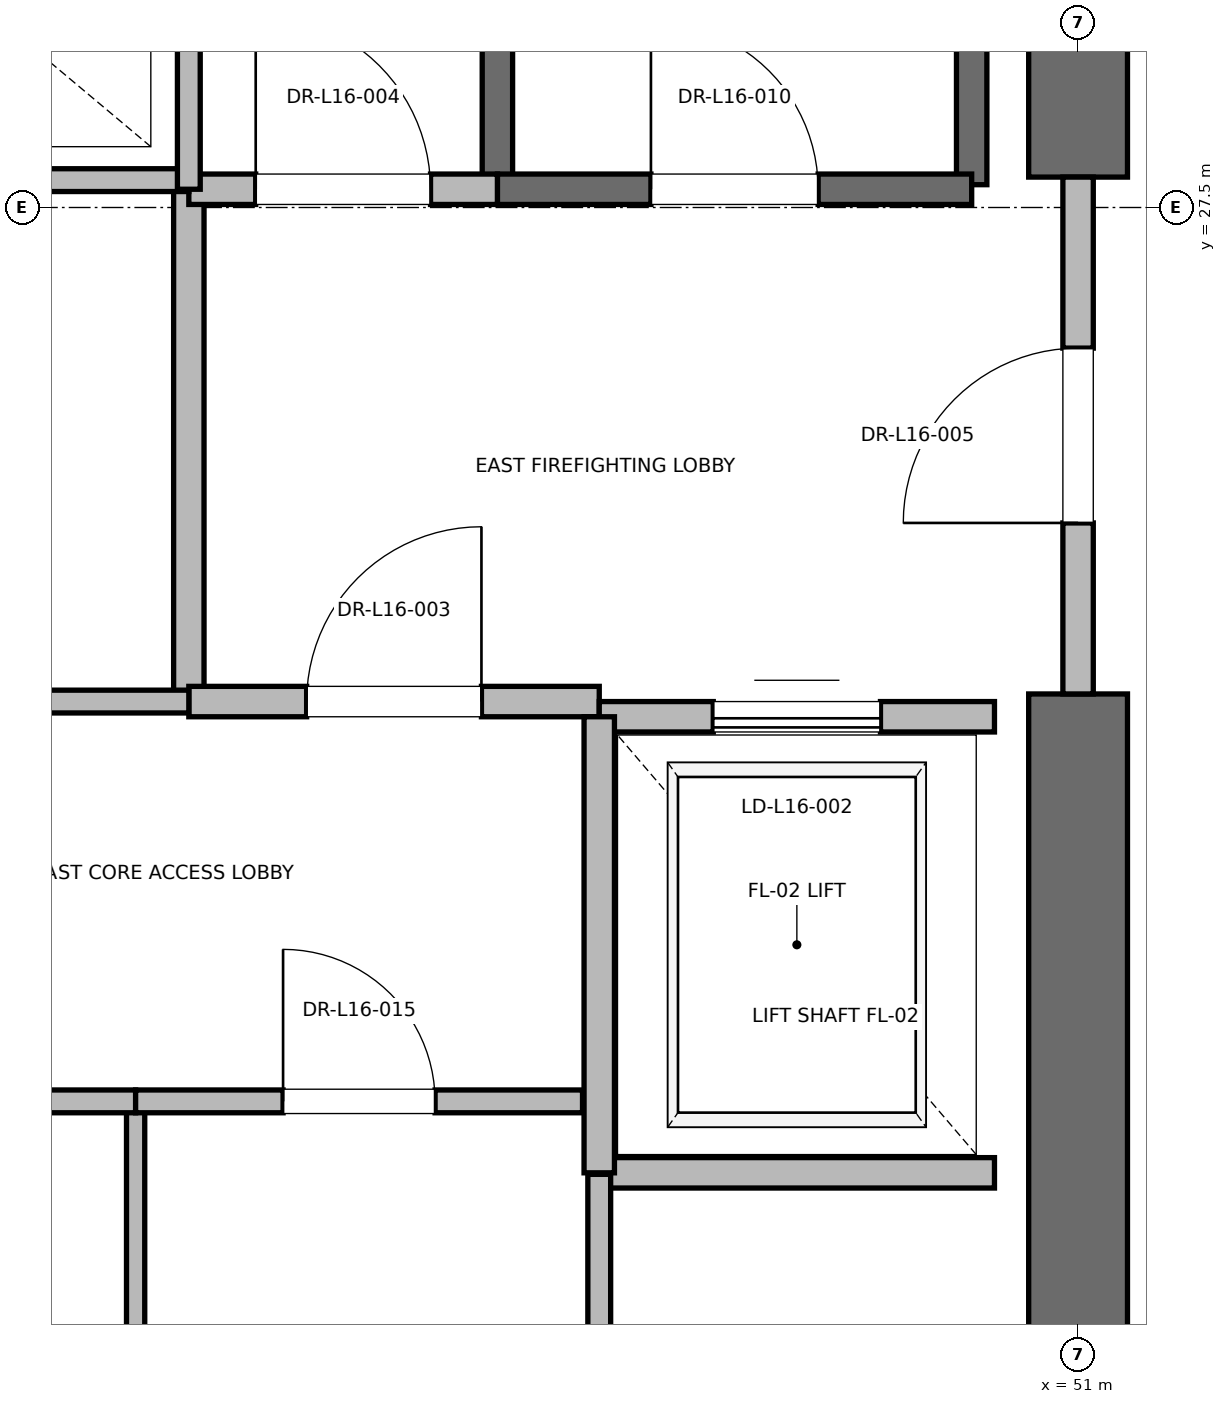
"""IFC4 building model, lengths in metres.
Left out: names, types, materials, properties, quantities, classifications, styles, units other than length and angle.
Written with IfcOpenShell. Run it as: python <this file> out.ifc"""

import sys

from ifc_helpers import new_model, si_unit, direction, frame, frame_2d, origin, place, context, subcontext, project, spatial, rectangle, extrude, element, fill, save


model = new_model("IFC4")
c1 = context("Model", 3, precision=1e-05, world=origin(), true_north=direction((0.0, 1.0)))
c2 = subcontext(c1, "Body", "Model", "MODEL_VIEW")
j1 = project(units=[si_unit("LENGTHUNIT", "METRE"), si_unit("PLANEANGLEUNIT", "RADIAN")], contexts=[c1])
p1 = place(None, origin())
s1 = spatial("IfcSite", under=j1, at=p1, CompositionType="ELEMENT")
p2 = place(p1, origin())
s2 = spatial("IfcBuilding", under=s1, at=p2, CompositionType="ELEMENT")
p3 = place(p2, frame((0.0, 0.0, 71.6)))
s3 = spatial("IfcBuildingStorey", under=s2, at=p3, CompositionType="ELEMENT", Elevation=71.6)
p4 = place(p3, frame((51.0, 18.5, 0.0), z_axis=(0.0, 0.0, 1.0), x_axis=(0.0, 1.0, 0.0)))
e1 = element("IfcWall", 1, at=p4, inside=s3, PredefinedType="SHEAR", context=c2, shape_type="SweptSolid", body=[
    extrude(rectangle(XDim=5.8, YDim=0.65, at=frame_2d((2.9, 0.0))), origin(), (0.0, 0.0, 1.0), 3.76),
])
p5 = place(p3, frame((51.0, 27.7, 0.0), z_axis=(0.0, 0.0, 1.0), x_axis=(0.0, 1.0, 0.0)))
e2 = element("IfcWall", 2, at=p5, inside=s3, PredefinedType="SHEAR", context=c2, shape_type="SweptSolid", body=[
    extrude(rectangle(XDim=8.8, YDim=0.65, at=frame_2d((4.4, 0.0))), origin(), (0.0, 0.0, 1.0), 3.76),
])
p6 = place(p3, frame((50.3, 27.65, 0.0), z_axis=(0.0, 0.0, 1.0), x_axis=(0.0, 1.0, 0.0)))
e3 = element("IfcWall", 3, at=p6, inside=s3, PredefinedType="SOLIDWALL", context=c2, shape_type="SweptSolid", body=[
    extrude(rectangle(XDim=8.15, YDim=0.2, at=frame_2d((4.075, 0.0))), origin(), (0.0, 0.0, 1.0), 3.76),
])
p7 = place(p3, frame((47.18, 27.62, 0.0), z_axis=(0.0, 0.0, 1.0), x_axis=(0.0, 1.0, 0.0)))
e4 = element("IfcWall", 4, at=p7, inside=s3, PredefinedType="SOLIDWALL", context=c2, shape_type="SweptSolid", body=[
    extrude(rectangle(XDim=8.18, YDim=0.2, at=frame_2d((4.09, 0.0))), origin(), (0.0, 0.0, 1.0), 3.76),
])
p8 = place(p3, frame((47.18, 27.62, 0.0), z_axis=(0.0, 0.0, 1.0), x_axis=(1.0, 0.0, 0.0)))
e5 = element("IfcWall", 5, at=p8, inside=s3, PredefinedType="SOLIDWALL", context=c2, shape_type="SweptSolid", body=[
    extrude(rectangle(XDim=3.12, YDim=0.2, at=frame_2d((1.56, 0.0))), origin(), (0.0, 0.0, 1.0), 3.76),
])
p9 = place(p8, frame((1.01, 0.0, 0.0)))
e6 = element("IfcOpeningElement", 6, at=p9, cuts=e5, PredefinedType="OPENING", context=c2, shape_type="SweptSolid", body=[
    extrude(rectangle(XDim=1.1, YDim=2.15, at=frame_2d((0.55, 1.075))), frame((0.0, 0.1, 0.0), z_axis=(0.0, -1.0, 0.0), x_axis=(1.0, 0.0, 0.0)), (0.0, 0.0, 1.0), 0.2),
])
p10 = place(p3, frame((45.15, 24.25, 0.0), z_axis=(0.0, 0.0, 1.0), x_axis=(0.0, 1.0, 0.0)))
e7 = element("IfcWall", 7, at=p10, inside=s3, PredefinedType="PARTITIONING", context=c2, shape_type="SweptSolid", body=[
    extrude(rectangle(XDim=3.37, YDim=0.2, at=frame_2d((1.685, 0.0))), origin(), (0.0, 0.0, 1.0), 3.76),
])
p11 = place(p3, frame((45.15, 24.25, 0.0), z_axis=(0.0, 0.0, 1.0), x_axis=(1.0, 0.0, 0.0)))
e8 = element("IfcWall", 8, at=p11, inside=s3, PredefinedType="PARTITIONING", context=c2, shape_type="SweptSolid", body=[
    extrude(rectangle(XDim=2.7, YDim=0.2, at=frame_2d((1.35, 0.0))), origin(), (0.0, 0.0, 1.0), 3.76),
])
p12 = place(p11, frame((0.775, 0.0, 0.0)))
e9 = element("IfcOpeningElement", 9, at=p12, cuts=e8, PredefinedType="OPENING", context=c2, shape_type="SweptSolid", body=[
    extrude(rectangle(XDim=1.15, YDim=2.2, at=frame_2d((0.575, 1.1))), frame((0.0, 0.1, 0.0), z_axis=(0.0, -1.0, 0.0), x_axis=(1.0, 0.0, 0.0)), (0.0, 0.0, 1.0), 0.2),
])
p13 = place(p3, frame((45.15, 27.62, 0.0), z_axis=(0.0, 0.0, 1.0), x_axis=(1.0, 0.0, 0.0)))
e10 = element("IfcWall", 10, at=p13, inside=s3, PredefinedType="PARTITIONING", context=c2, shape_type="SweptSolid", body=[
    extrude(rectangle(XDim=2.03, YDim=0.2, at=frame_2d((1.015, 0.0))), origin(), (0.0, 0.0, 1.0), 3.76),
])
p14 = place(p13, frame((0.44, 0.0, 0.0)))
e11 = element("IfcOpeningElement", 11, at=p14, cuts=e10, PredefinedType="OPENING", context=c2, shape_type="SweptSolid", body=[
    extrude(rectangle(XDim=1.15, YDim=2.2, at=frame_2d((0.575, 1.1))), frame((0.0, 0.1, 0.0), z_axis=(0.0, -1.0, 0.0), x_axis=(1.0, 0.0, 0.0)), (0.0, 0.0, 1.0), 0.2),
])
p15 = place(p3, frame((51.0, 24.3, 0.0), z_axis=(0.0, 0.0, 1.0), x_axis=(0.0, 1.0, 0.0)))
e12 = element("IfcWall", 12, at=p15, inside=s3, PredefinedType="PARTITIONING", context=c2, shape_type="SweptSolid", body=[
    extrude(rectangle(XDim=3.4, YDim=0.2, at=frame_2d((1.7, 0.0))), origin(), (0.0, 0.0, 1.0), 2.54),
])
p16 = place(p15, frame((1.125, 0.0, 0.0)))
e13 = element("IfcOpeningElement", 13, at=p16, cuts=e12, PredefinedType="OPENING", context=c2, shape_type="SweptSolid", body=[
    extrude(rectangle(XDim=1.15, YDim=2.2, at=frame_2d((0.575, 1.1))), frame((0.0, 0.1, 0.0), z_axis=(0.0, -1.0, 0.0), x_axis=(1.0, 0.0, 0.0)), (0.0, 0.0, 1.0), 0.2),
])
p17 = place(p3, frame((47.85, 21.15, 0.0), z_axis=(0.0, 0.0, 1.0), x_axis=(1.0, 0.0, 0.0)))
e14 = element("IfcWall", 14, at=p17, inside=s3, PredefinedType="SOLIDWALL", context=c2, shape_type="SweptSolid", body=[
    extrude(rectangle(XDim=2.6, YDim=0.2, at=frame_2d((1.3, 0.0))), origin(), (0.0, 0.0, 1.0), 3.76),
])
p18 = place(p3, frame((50.45, 24.15, 0.0), z_axis=(0.0, 0.0, 1.0), x_axis=(-1.0, 0.0, 0.0)))
e15 = element("IfcWall", 15, at=p18, inside=s3, PredefinedType="SOLIDWALL", context=c2, shape_type="SweptSolid", body=[
    extrude(rectangle(XDim=2.6, YDim=0.2, at=frame_2d((1.3, 0.0))), origin(), (0.0, 0.0, 1.0), 2.54),
])
p19 = place(p18, frame((0.75, 0.0, 0.0)))
e16 = element("IfcOpeningElement", 16, at=p19, cuts=e15, PredefinedType="OPENING", context=c2, shape_type="SweptSolid", body=[
    extrude(rectangle(XDim=1.1, YDim=2.2, at=frame_2d((0.55, 1.1))), frame((0.0, 0.1, 0.0), z_axis=(0.0, -1.0, 0.0), x_axis=(1.0, 0.0, 0.0)), (0.0, 0.0, 1.0), 0.2),
])
p20 = place(p3, frame((47.85, 24.15, 0.0), z_axis=(0.0, 0.0, 1.0), x_axis=(0.0, -1.0, 0.0)))
e17 = element("IfcWall", 17, at=p20, inside=s3, PredefinedType="SOLIDWALL", context=c2, shape_type="SweptSolid", body=[
    extrude(rectangle(XDim=3.0, YDim=0.2, at=frame_2d((1.5, 0.0))), origin(), (0.0, 0.0, 1.0), 3.76),
])
p21 = place(p3, frame((41.56, 27.68, 0.0), z_axis=(0.0, 0.0, 1.0), x_axis=(1.0, 0.0, 0.0)))
e18 = element("IfcWall", 18, at=p21, inside=s3, PredefinedType="PARTITIONING", context=c2, shape_type="SweptSolid", body=[
    extrude(rectangle(XDim=3.59, YDim=0.15, at=frame_2d((1.795, 0.0))), origin(), (0.0, 0.0, 1.0), 2.85),
])
p22 = place(p3, frame((47.85, 18.6, 0.0), z_axis=(0.0, 0.0, 1.0), x_axis=(0.0, 1.0, 0.0)))
e19 = element("IfcWall", 19, at=p22, inside=s3, PredefinedType="PARTITIONING", context=c2, shape_type="SweptSolid", body=[
    extrude(rectangle(XDim=2.54, YDim=0.15, at=frame_2d((1.27, 0.0))), origin(), (0.0, 0.0, 1.0), 2.85),
])
p23 = place(p3, frame((44.8, 18.6, 0.0), z_axis=(0.0, 0.0, 1.0), x_axis=(0.0, 1.0, 0.0)))
e20 = element("IfcWall", 20, at=p23, inside=s3, PredefinedType="PARTITIONING", context=c2, shape_type="SweptSolid", body=[
    extrude(rectangle(XDim=3.02, YDim=0.12, at=frame_2d((1.51, 0.0))), origin(), (0.0, 0.0, 1.0), 2.85),
])
p24 = place(p3, frame((41.76, 21.62, 0.0), z_axis=(0.0, 0.0, 1.0), x_axis=(1.0, 0.0, 0.0)))
e21 = element("IfcWall", 21, at=p24, inside=s3, PredefinedType="PARTITIONING", context=c2, shape_type="SweptSolid", body=[
    extrude(rectangle(XDim=3.04, YDim=0.15, at=frame_2d((1.52, 0.0))), origin(), (0.0, 0.0, 1.0), 2.85),
])
p25 = place(p24, frame((1.02, 0.0, 0.0)))
e22 = element("IfcOpeningElement", 22, at=p25, cuts=e21, PredefinedType="OPENING", context=c2, shape_type="SweptSolid", body=[
    extrude(rectangle(XDim=1.0, YDim=2.15, at=frame_2d((0.5, 1.075))), frame((0.0, 0.075, 0.0), z_axis=(0.0, -1.0, 0.0), x_axis=(1.0, 0.0, 0.0)), (0.0, 0.0, 1.0), 0.15),
])
p26 = place(p3, frame((44.8, 21.62, 0.0), z_axis=(0.0, 0.0, 1.0), x_axis=(1.0, 0.0, 0.0)))
e23 = element("IfcWall", 23, at=p26, inside=s3, PredefinedType="PARTITIONING", context=c2, shape_type="SweptSolid", body=[
    extrude(rectangle(XDim=2.94, YDim=0.15, at=frame_2d((1.47, 0.0))), origin(), (0.0, 0.0, 1.0), 2.85),
])
p27 = place(p26, frame((0.97, 0.0, 0.0)))
e24 = element("IfcOpeningElement", 24, at=p27, cuts=e23, PredefinedType="OPENING", context=c2, shape_type="SweptSolid", body=[
    extrude(rectangle(XDim=1.0, YDim=2.15, at=frame_2d((0.5, 1.075))), frame((0.0, 0.075, 0.0), z_axis=(0.0, -1.0, 0.0), x_axis=(1.0, 0.0, 0.0)), (0.0, 0.0, 1.0), 0.15),
])
p28 = place(p3, frame((41.76, 24.25, 0.0), z_axis=(0.0, 0.0, 1.0), x_axis=(1.0, 0.0, 0.0)))
e25 = element("IfcWall", 25, at=p28, inside=s3, PredefinedType="PARTITIONING", context=c2, shape_type="SweptSolid", body=[
    extrude(rectangle(XDim=3.39, YDim=0.15, at=frame_2d((1.695, 0.0))), origin(), (0.0, 0.0, 1.0), 2.85),
])
p29 = place(p28, frame((1.255, 0.0, 0.0)))
e26 = element("IfcOpeningElement", 26, at=p29, cuts=e25, PredefinedType="OPENING", context=c2, shape_type="SweptSolid", body=[
    extrude(rectangle(XDim=0.88, YDim=2.1, at=frame_2d((0.44, 1.05))), frame((0.0, 0.075, 0.0), z_axis=(0.0, -1.0, 0.0), x_axis=(1.0, 0.0, 0.0)), (0.0, 0.0, 1.0), 0.15),
])
p30 = place(p3, frame((45.15, 27.62, 0.0), z_axis=(0.0, 0.0, 1.0), x_axis=(0.0, 1.0, 0.0)))
e27 = element("IfcWall", 27, at=p30, inside=s3, PredefinedType="PARTITIONING", context=c2, shape_type="SweptSolid", body=[
    extrude(rectangle(XDim=3.1, YDim=0.15, at=frame_2d((1.55, 0.0))), origin(), (0.0, 0.0, 1.0), 2.85),
])
p31 = place(p9, origin())
e28 = element("IfcDoor", 28, at=p31, inside=s3, OperationType="SINGLE_SWING_LEFT", PredefinedType="DOOR", context=c2, shape_type="SweptSolid", body=[
    extrude(rectangle(XDim=1.1, YDim=2.15, at=frame_2d((0.55, 1.075))), frame((0.0, 0.025, 0.0), z_axis=(0.0, -1.0, 0.0), x_axis=(1.0, 0.0, 0.0)), (0.0, 0.0, 1.0), 0.05),
])
fill(e6, e28)
p32 = place(p12, origin())
e29 = element("IfcDoor", 29, at=p32, inside=s3, OperationType="SINGLE_SWING_RIGHT", PredefinedType="DOOR", context=c2, shape_type="SweptSolid", body=[
    extrude(rectangle(XDim=1.15, YDim=2.2, at=frame_2d((0.575, 1.1))), frame((0.0, 0.025, 0.0), z_axis=(0.0, -1.0, 0.0), x_axis=(1.0, 0.0, 0.0)), (0.0, 0.0, 1.0), 0.05),
])
fill(e9, e29)
p33 = place(p14, origin())
e30 = element("IfcDoor", 30, at=p33, inside=s3, OperationType="SINGLE_SWING_LEFT", PredefinedType="DOOR", context=c2, shape_type="SweptSolid", body=[
    extrude(rectangle(XDim=1.15, YDim=2.2, at=frame_2d((0.575, 1.1))), frame((0.0, 0.025, 0.0), z_axis=(0.0, -1.0, 0.0), x_axis=(1.0, 0.0, 0.0)), (0.0, 0.0, 1.0), 0.05),
])
fill(e11, e30)
p34 = place(p16, origin())
e31 = element("IfcDoor", 31, at=p34, inside=s3, OperationType="SINGLE_SWING_LEFT", PredefinedType="DOOR", context=c2, shape_type="SweptSolid", body=[
    extrude(rectangle(XDim=1.15, YDim=2.2, at=frame_2d((0.575, 1.1))), frame((0.0, 0.025, 0.0), z_axis=(0.0, -1.0, 0.0), x_axis=(1.0, 0.0, 0.0)), (0.0, 0.0, 1.0), 0.05),
])
fill(e13, e31)
p35 = place(p19, origin())
e32 = element("IfcDoor", 32, at=p35, inside=s3, OperationType="SLIDING_TO_RIGHT", PredefinedType="DOOR", context=c2, shape_type="SweptSolid", body=[
    extrude(rectangle(XDim=1.1, YDim=2.2, at=frame_2d((0.55, 1.1))), frame((0.0, 0.025, 0.0), z_axis=(0.0, -1.0, 0.0), x_axis=(1.0, 0.0, 0.0)), (0.0, 0.0, 1.0), 0.05),
])
fill(e16, e32)
p36 = place(p27, origin())
e33 = element("IfcDoor", 33, at=p36, inside=s3, OperationType="SINGLE_SWING_LEFT", PredefinedType="DOOR", context=c2, shape_type="SweptSolid", body=[
    extrude(rectangle(XDim=1.0, YDim=2.15, at=frame_2d((0.5, 1.075))), frame((0.0, 0.025, 0.0), z_axis=(0.0, -1.0, 0.0), x_axis=(1.0, 0.0, 0.0)), (0.0, 0.0, 1.0), 0.05),
])
fill(e24, e33)
save(model, sys.argv[1])
